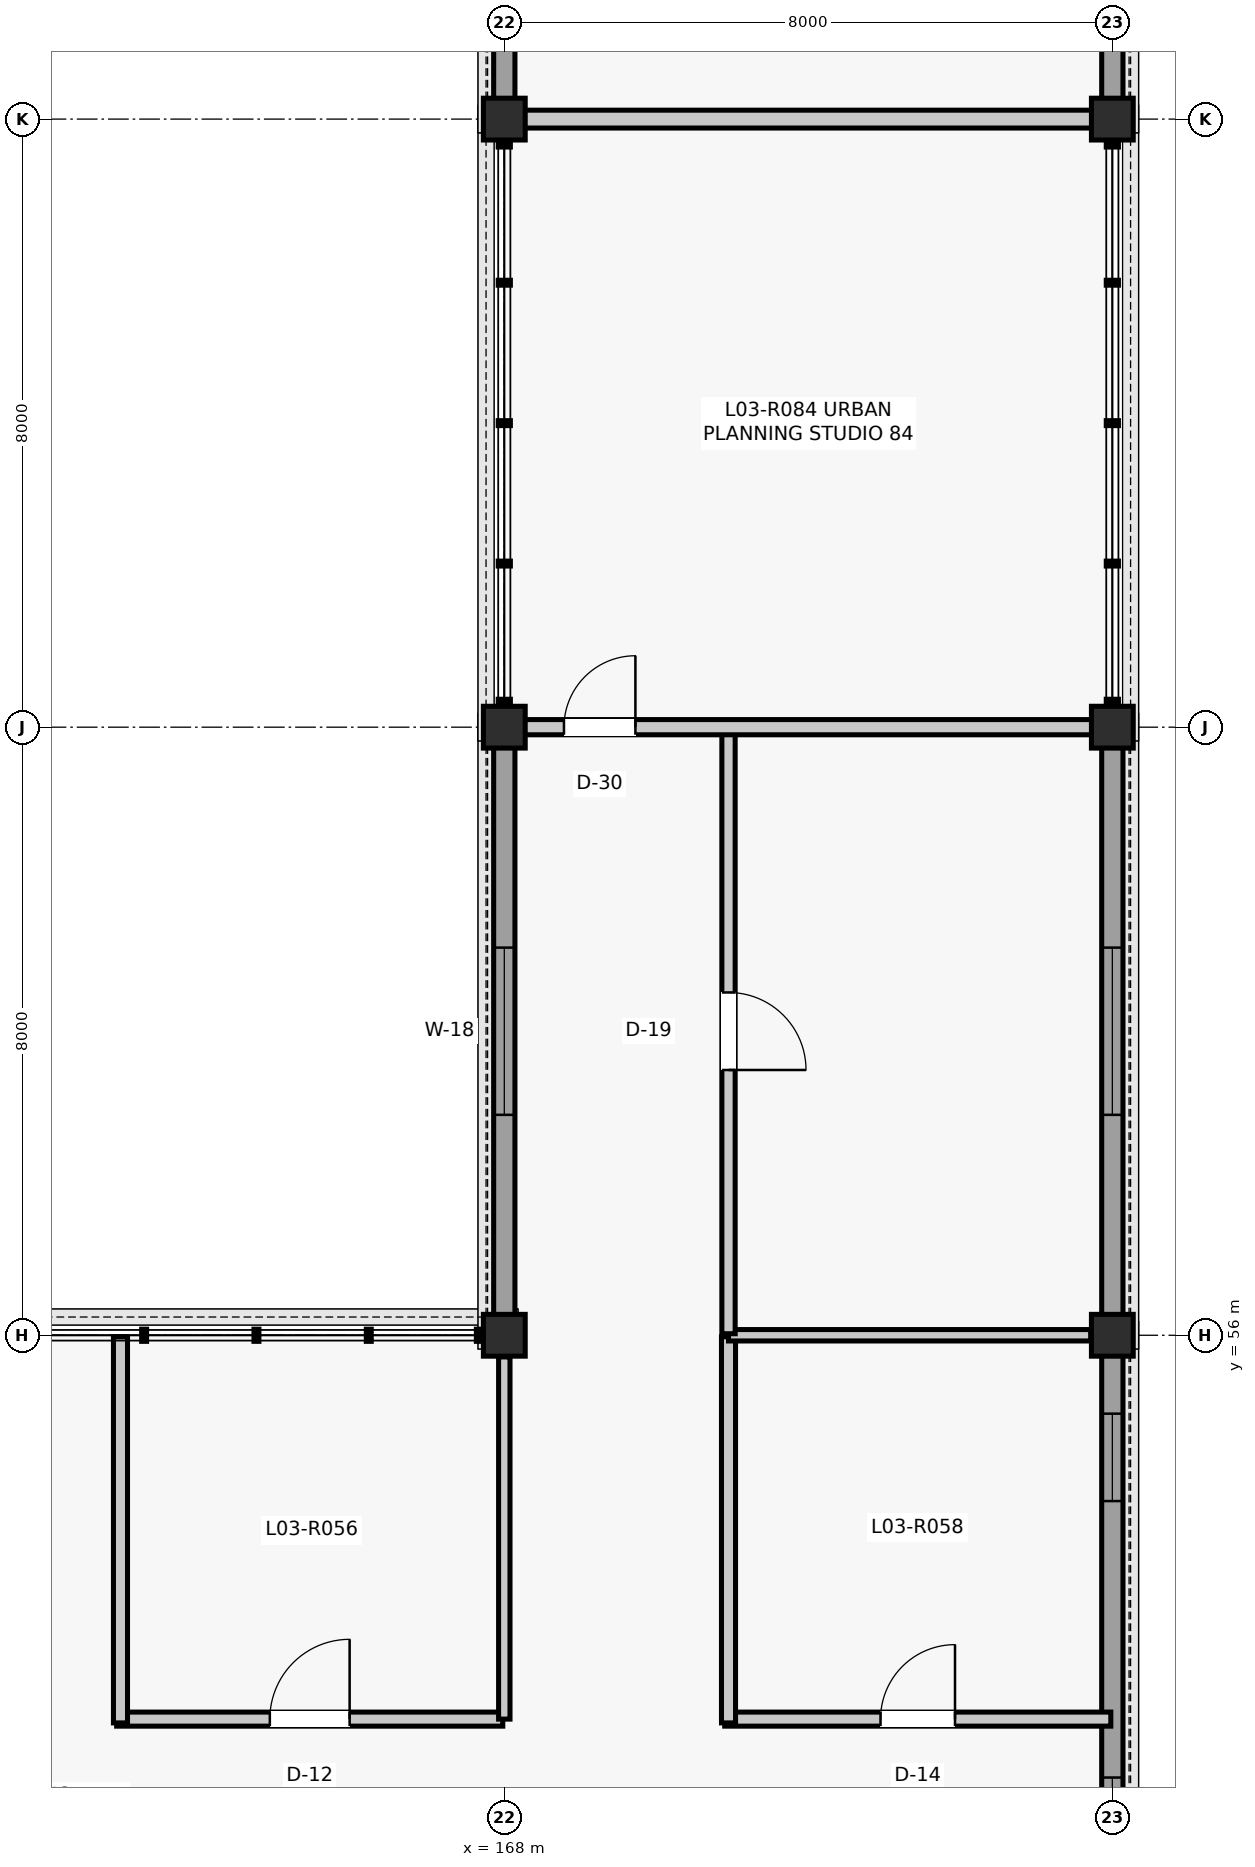
"""IFC4 building model, lengths in metres.
Left out: names, types, materials, properties, quantities, classifications, styles, units other than length and angle.
Written with IfcOpenShell. Run it as: python <this file> out.ifc"""

import sys

from ifc_helpers import new_model, si_unit, direction, frame, frame_2d, origin, origin_2d, place, context, subcontext, project, spatial, rectangle, extrude, element, fill, save


model = new_model("IFC4")
c1 = context("Model", 3, precision=1e-05, world=origin(), true_north=direction((0.0, 1.0)))
c2 = subcontext(c1, "Body", "Model", "MODEL_VIEW")
j1 = project(units=[si_unit("LENGTHUNIT", "METRE"), si_unit("PLANEANGLEUNIT", "RADIAN")], contexts=[c1])
p1 = place(None, origin())
s1 = spatial("IfcSite", under=j1, at=p1, CompositionType="ELEMENT")
p2 = place(p1, origin())
s2 = spatial("IfcBuilding", under=s1, at=p2, CompositionType="ELEMENT")
p3 = place(p2, frame((0.0, 0.0, 13.86)))
s3 = spatial("IfcBuildingStorey", under=s2, at=p3, CompositionType="ELEMENT", Elevation=13.86)
for number, where, z_axis, x_axis in (
    (1, (168.0, 56.0, 0.0), (0.0, 0.0, 1.0), (1.0, 0.0, 0.0)),
    (2, (168.0, 64.0, 0.0), (0.0, 0.0, 1.0), (1.0, 0.0, 0.0)),
    (3, (168.0, 72.0, 0.0), (0.0, 0.0, 1.0), (1.0, 0.0, 0.0)),
    (4, (176.0, 56.0, 0.0), (0.0, 0.0, 1.0), (1.0, 0.0, 0.0)),
    (5, (176.0, 64.0, 0.0), (0.0, 0.0, 1.0), (1.0, 0.0, 0.0)),
    (6, (176.0, 72.0, 0.0), (0.0, 0.0, 1.0), (1.0, 0.0, 0.0)),
):
    element("IfcColumn", number, at=place(p3, frame(where, z_axis=z_axis, x_axis=x_axis)), inside=s3, PredefinedType="COLUMN", context=c2, shape_type="SweptSolid", body=[
        extrude(rectangle(XDim=0.55, YDim=0.55, at=origin_2d()), origin(), (0.0, 0.0, 1.0), 3.96),
    ])
p4 = place(p3, frame((176.0, 48.26, 0.0), z_axis=(0.0, 0.0, 1.0), x_axis=(0.0, 1.0, 0.0)))
e7 = element("IfcWall", 7, at=p4, inside=s3, PredefinedType="SOLIDWALL", context=c2, shape_type="SweptSolid", body=[
    extrude(rectangle(XDim=7.48, YDim=0.28, at=frame_2d((3.74, 0.0))), origin(), (0.0, 0.0, 1.0), 3.367),
])
p5 = place(p4, frame((0.771, 0.0, 0.95)))
e8 = element("IfcOpeningElement", 8, at=p5, cuts=e7, PredefinedType="OPENING", context=c2, shape_type="SweptSolid", body=[
    extrude(rectangle(XDim=1.15, YDim=1.65, at=frame_2d((0.575, 0.825))), frame((0.0, 0.15, 0.0), z_axis=(0.0, -1.0, 0.0), x_axis=(1.0, 0.0, 0.0)), (0.0, 0.0, 1.0), 0.3),
])
p6 = place(p4, frame((5.559, 0.0, 0.95)))
e9 = element("IfcOpeningElement", 9, at=p6, cuts=e7, PredefinedType="OPENING", context=c2, shape_type="SweptSolid", body=[
    extrude(rectangle(XDim=1.15, YDim=1.65, at=frame_2d((0.575, 0.825))), frame((0.0, 0.15, 0.0), z_axis=(0.0, -1.0, 0.0), x_axis=(1.0, 0.0, 0.0)), (0.0, 0.0, 1.0), 0.3),
])
p7 = place(p3, frame((168.0, 56.26, 0.0), z_axis=(0.0, 0.0, 1.0), x_axis=(0.0, 1.0, 0.0)))
e10 = element("IfcWall", 10, at=p7, inside=s3, PredefinedType="SOLIDWALL", context=c2, shape_type="SweptSolid", body=[
    extrude(rectangle(XDim=7.48, YDim=0.28, at=frame_2d((3.74, 0.0))), origin(), (0.0, 0.0, 1.0), 3.367),
])
p8 = place(p7, frame((2.64, 0.0, 1.35)))
e11 = element("IfcOpeningElement", 11, at=p8, cuts=e10, PredefinedType="OPENING", context=c2, shape_type="SweptSolid", body=[
    extrude(rectangle(XDim=2.2, YDim=1.3, at=frame_2d((1.1, 0.65))), frame((0.0, 0.15, 0.0), z_axis=(0.0, -1.0, 0.0), x_axis=(1.0, 0.0, 0.0)), (0.0, 0.0, 1.0), 0.3),
])
p9 = place(p3, frame((176.0, 56.26, 0.0), z_axis=(0.0, 0.0, 1.0), x_axis=(0.0, 1.0, 0.0)))
e12 = element("IfcWall", 12, at=p9, inside=s3, PredefinedType="SOLIDWALL", context=c2, shape_type="SweptSolid", body=[
    extrude(rectangle(XDim=7.48, YDim=0.28, at=frame_2d((3.74, 0.0))), origin(), (0.0, 0.0, 1.0), 3.3),
])
p10 = place(p9, frame((2.64, 0.0, 1.35)))
e13 = element("IfcOpeningElement", 13, at=p10, cuts=e12, PredefinedType="OPENING", context=c2, shape_type="SweptSolid", body=[
    extrude(rectangle(XDim=2.2, YDim=1.3, at=frame_2d((1.1, 0.65))), frame((0.0, 0.15, 0.0), z_axis=(0.0, -1.0, 0.0), x_axis=(1.0, 0.0, 0.0)), (0.0, 0.0, 1.0), 0.3),
])
p11 = place(p3, frame((168.0, 72.26, 0.0), z_axis=(0.0, 0.0, 1.0), x_axis=(0.0, 1.0, 0.0)))
e14 = element("IfcWall", 14, at=p11, inside=s3, PredefinedType="SOLIDWALL", context=c2, shape_type="SweptSolid", body=[
    extrude(rectangle(XDim=7.43, YDim=0.28, at=frame_2d((3.715, 0.0))), origin(), (0.0, 0.0, 1.0), 3.364),
])
p12 = place(p11, frame((2.615, 0.0, 1.35)))
e15 = element("IfcOpeningElement", 15, at=p12, cuts=e14, PredefinedType="OPENING", context=c2, shape_type="SweptSolid", body=[
    extrude(rectangle(XDim=2.2, YDim=1.3, at=frame_2d((1.1, 0.65))), frame((0.0, 0.15, 0.0), z_axis=(0.0, -1.0, 0.0), x_axis=(1.0, 0.0, 0.0)), (0.0, 0.0, 1.0), 0.3),
])
p13 = place(p3, frame((176.0, 72.26, 0.0), z_axis=(0.0, 0.0, 1.0), x_axis=(0.0, 1.0, 0.0)))
e16 = element("IfcWall", 16, at=p13, inside=s3, PredefinedType="SOLIDWALL", context=c2, shape_type="SweptSolid", body=[
    extrude(rectangle(XDim=7.43, YDim=0.28, at=frame_2d((3.715, 0.0))), origin(), (0.0, 0.0, 1.0), 3.304),
])
p14 = place(p13, frame((2.615, 0.0, 1.35)))
e17 = element("IfcOpeningElement", 17, at=p14, cuts=e16, PredefinedType="OPENING", context=c2, shape_type="SweptSolid", body=[
    extrude(rectangle(XDim=2.2, YDim=1.3, at=frame_2d((1.1, 0.65))), frame((0.0, 0.15, 0.0), z_axis=(0.0, -1.0, 0.0), x_axis=(1.0, 0.0, 0.0)), (0.0, 0.0, 1.0), 0.3),
])
p15 = place(p3, frame((162.9, 50.95, 0.0), z_axis=(0.0, 0.0, 1.0), x_axis=(1.0, 0.0, 0.0)))
e18 = element("IfcWall", 18, at=p15, inside=s3, PredefinedType="PARTITIONING", context=c2, shape_type="SweptSolid", body=[
    extrude(rectangle(XDim=5.08, YDim=0.185, at=frame_2d((2.54, 0.0))), origin(), (0.0, 0.0, 1.0), 3.247),
])
p16 = place(p15, frame((2.015, 0.0, 0.0)))
e19 = element("IfcOpeningElement", 19, at=p16, cuts=e18, PredefinedType="OPENING", context=c2, shape_type="SweptSolid", body=[
    extrude(rectangle(XDim=1.05, YDim=2.15, at=frame_2d((0.525, 1.075))), frame((0.0, 0.103, 0.0), z_axis=(0.0, -1.0, 0.0), x_axis=(1.0, 0.0, 0.0)), (0.0, 0.0, 1.0), 0.205),
])
p17 = place(p3, frame((162.95, 50.9, 0.0), z_axis=(0.0, 0.0, 1.0), x_axis=(0.0, 1.0, 0.0)))
e20 = element("IfcWall", 20, at=p17, inside=s3, PredefinedType="PARTITIONING", context=c2, shape_type="SweptSolid", body=[
    extrude(rectangle(XDim=5.08, YDim=0.185, at=frame_2d((2.54, 0.0))), origin(), (0.0, 0.0, 1.0), 3.297),
])
p18 = place(p3, frame((168.0, 50.95, 0.0), z_axis=(0.0, 0.0, 1.0), x_axis=(0.0, 1.0, 0.0)))
e21 = element("IfcWall", 21, at=p18, inside=s3, PredefinedType="PARTITIONING", context=c2, shape_type="SweptSolid", body=[
    extrude(rectangle(XDim=4.765, YDim=0.15, at=frame_2d((2.383, 0.0))), origin(), (0.0, 0.0, 1.0), 3.247),
])
p19 = place(p3, frame((170.9, 50.95, 0.0), z_axis=(0.0, 0.0, 1.0), x_axis=(1.0, 0.0, 0.0)))
e22 = element("IfcWall", 22, at=p19, inside=s3, PredefinedType="PARTITIONING", context=c2, shape_type="SweptSolid", body=[
    extrude(rectangle(XDim=5.08, YDim=0.185, at=frame_2d((2.54, 0.0))), origin(), (0.0, 0.0, 1.0), 3.36),
])
p20 = place(p19, frame((2.05, 0.0, 0.0)))
e23 = element("IfcOpeningElement", 23, at=p20, cuts=e22, PredefinedType="OPENING", context=c2, shape_type="SweptSolid", body=[
    extrude(rectangle(XDim=0.98, YDim=2.15, at=frame_2d((0.49, 1.075))), frame((0.0, 0.103, 0.0), z_axis=(0.0, -1.0, 0.0), x_axis=(1.0, 0.0, 0.0)), (0.0, 0.0, 1.0), 0.205),
])
p21 = place(p3, frame((170.95, 50.9, 0.0), z_axis=(0.0, 0.0, 1.0), x_axis=(0.0, 1.0, 0.0)))
e24 = element("IfcWall", 24, at=p21, inside=s3, PredefinedType="PARTITIONING", context=c2, shape_type="SweptSolid", body=[
    extrude(rectangle(XDim=5.08, YDim=0.185, at=frame_2d((2.54, 0.0))), origin(), (0.0, 0.0, 1.0), 3.247),
])
p22 = place(p3, frame((170.95, 56.0, 0.0), z_axis=(0.0, 0.0, 1.0), x_axis=(1.0, 0.0, 0.0)))
e25 = element("IfcWall", 25, at=p22, inside=s3, PredefinedType="PARTITIONING", context=c2, shape_type="SweptSolid", body=[
    extrude(rectangle(XDim=4.765, YDim=0.15, at=frame_2d((2.383, 0.0))), origin(), (0.0, 0.0, 1.0), 3.247),
])
p23 = place(p3, frame((170.95, 56.02, 0.0), z_axis=(0.0, 0.0, 1.0), x_axis=(0.0, 1.0, 0.0)))
e26 = element("IfcWall", 26, at=p23, inside=s3, PredefinedType="PARTITIONING", context=c2, shape_type="SweptSolid", body=[
    extrude(rectangle(XDim=7.96, YDim=0.175, at=frame_2d((3.98, 0.0))), origin(), (0.0, 0.0, 1.0), 3.247),
])
p24 = place(p23, frame((3.47, 0.0, 0.0)))
e27 = element("IfcOpeningElement", 27, at=p24, cuts=e26, PredefinedType="OPENING", context=c2, shape_type="SweptSolid", body=[
    extrude(rectangle(XDim=1.02, YDim=2.2, at=frame_2d((0.51, 1.1))), frame((0.0, 0.097, 0.0), z_axis=(0.0, -1.0, 0.0), x_axis=(1.0, 0.0, 0.0)), (0.0, 0.0, 1.0), 0.195),
])
p25 = place(p3, frame((168.265, 64.0, 0.0), z_axis=(0.0, 0.0, 1.0), x_axis=(1.0, 0.0, 0.0)))
e28 = element("IfcWall", 28, at=p25, inside=s3, PredefinedType="PARTITIONING", context=c2, shape_type="SweptSolid", body=[
    extrude(rectangle(XDim=7.47, YDim=0.2, at=frame_2d((3.735, 0.0))), origin(), (0.0, 0.0, 1.0), 3.253),
])
p26 = place(p25, frame((0.52, 0.0, 0.0)))
e29 = element("IfcOpeningElement", 29, at=p26, cuts=e28, PredefinedType="OPENING", context=c2, shape_type="SweptSolid", body=[
    extrude(rectangle(XDim=0.94, YDim=2.12, at=frame_2d((0.47, 1.06))), frame((0.0, 0.11, 0.0), z_axis=(0.0, -1.0, 0.0), x_axis=(1.0, 0.0, 0.0)), (0.0, 0.0, 1.0), 0.22),
])
p27 = place(p3, frame((168.265, 72.0, 0.0), z_axis=(0.0, 0.0, 1.0), x_axis=(1.0, 0.0, 0.0)))
e30 = element("IfcWall", 30, at=p27, inside=s3, PredefinedType="PARTITIONING", context=c2, shape_type="SweptSolid", body=[
    extrude(rectangle(XDim=7.47, YDim=0.235, at=frame_2d((3.735, 0.0))), origin(), (0.0, 0.0, 1.0), 3.241),
])
p28 = place(p5, origin())
e31 = element("IfcWindow", 31, at=p28, inside=s3, PartitioningType="SINGLE_PANEL", PredefinedType="WINDOW", context=c2, shape_type="SweptSolid", body=[
    extrude(rectangle(XDim=1.15, YDim=1.65, at=frame_2d((0.575, 0.825))), frame((0.0, 0.03, 0.0), z_axis=(0.0, -1.0, 0.0), x_axis=(1.0, 0.0, 0.0)), (0.0, 0.0, 1.0), 0.06),
])
fill(e8, e31)
p29 = place(p6, origin())
e32 = element("IfcWindow", 32, at=p29, inside=s3, PartitioningType="SINGLE_PANEL", PredefinedType="WINDOW", context=c2, shape_type="SweptSolid", body=[
    extrude(rectangle(XDim=1.15, YDim=1.65, at=frame_2d((0.575, 0.825))), frame((0.0, 0.03, 0.0), z_axis=(0.0, -1.0, 0.0), x_axis=(1.0, 0.0, 0.0)), (0.0, 0.0, 1.0), 0.06),
])
fill(e9, e32)
p30 = place(p8, origin())
e33 = element("IfcWindow", 33, at=p30, inside=s3, PartitioningType="SINGLE_PANEL", PredefinedType="WINDOW", context=c2, shape_type="SweptSolid", body=[
    extrude(rectangle(XDim=2.2, YDim=1.3, at=frame_2d((1.1, 0.65))), frame((0.0, 0.03, 0.0), z_axis=(0.0, -1.0, 0.0), x_axis=(1.0, 0.0, 0.0)), (0.0, 0.0, 1.0), 0.06),
])
fill(e11, e33)
p31 = place(p10, origin())
e34 = element("IfcWindow", 34, at=p31, inside=s3, PartitioningType="SINGLE_PANEL", PredefinedType="WINDOW", context=c2, shape_type="SweptSolid", body=[
    extrude(rectangle(XDim=2.2, YDim=1.3, at=frame_2d((1.1, 0.65))), frame((0.0, 0.03, 0.0), z_axis=(0.0, -1.0, 0.0), x_axis=(1.0, 0.0, 0.0)), (0.0, 0.0, 1.0), 0.06),
])
fill(e13, e34)
p32 = place(p16, origin())
e35 = element("IfcDoor", 35, at=p32, inside=s3, OperationType="SINGLE_SWING_RIGHT", PredefinedType="DOOR", context=c2, shape_type="SweptSolid", body=[
    extrude(rectangle(XDim=1.05, YDim=2.15, at=frame_2d((0.525, 1.075))), frame((0.0, 0.025, 0.0), z_axis=(0.0, -1.0, 0.0), x_axis=(1.0, 0.0, 0.0)), (0.0, 0.0, 1.0), 0.05),
])
fill(e19, e35)
p33 = place(p20, origin())
e36 = element("IfcDoor", 36, at=p33, inside=s3, OperationType="SINGLE_SWING_RIGHT", PredefinedType="DOOR", context=c2, shape_type="SweptSolid", body=[
    extrude(rectangle(XDim=0.98, YDim=2.15, at=frame_2d((0.49, 1.075))), frame((0.0, 0.025, 0.0), z_axis=(0.0, -1.0, 0.0), x_axis=(1.0, 0.0, 0.0)), (0.0, 0.0, 1.0), 0.05),
])
fill(e23, e36)
p34 = place(p24, frame((1.02, 0.0, 0.0), z_axis=(0.0, 0.0, 1.0), x_axis=(-1.0, 0.0, 0.0)))
e37 = element("IfcDoor", 37, at=p34, inside=s3, OperationType="SINGLE_SWING_LEFT", PredefinedType="DOOR", context=c2, shape_type="SweptSolid", body=[
    extrude(rectangle(XDim=1.02, YDim=2.2, at=frame_2d((0.51, 1.1))), frame((0.0, 0.025, 0.0), z_axis=(0.0, -1.0, 0.0), x_axis=(1.0, 0.0, 0.0)), (0.0, 0.0, 1.0), 0.05),
])
fill(e27, e37)
p35 = place(p26, origin())
e38 = element("IfcDoor", 38, at=p35, inside=s3, OperationType="SINGLE_SWING_RIGHT", PredefinedType="DOOR", context=c2, shape_type="SweptSolid", body=[
    extrude(rectangle(XDim=0.94, YDim=2.12, at=frame_2d((0.47, 1.06))), frame((0.0, 0.025, 0.0), z_axis=(0.0, -1.0, 0.0), x_axis=(1.0, 0.0, 0.0)), (0.0, 0.0, 1.0), 0.05),
])
fill(e29, e38)
save(model, sys.argv[1])
